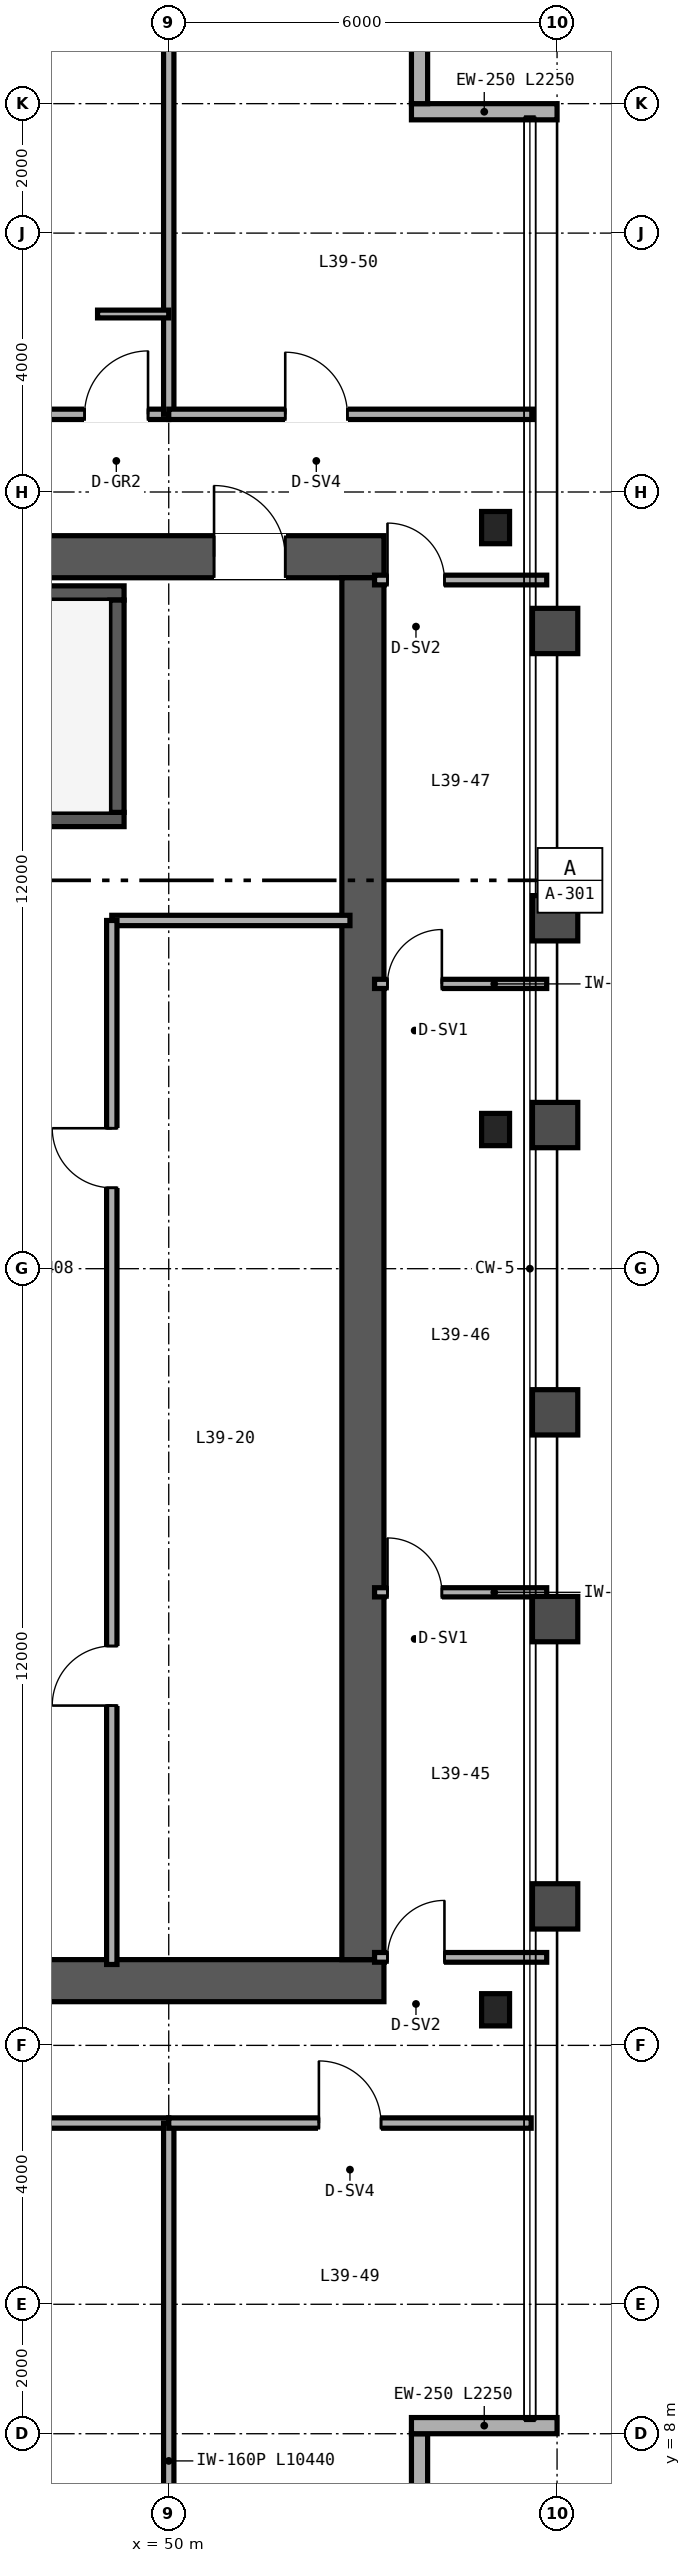
"""IFC4 building model, lengths in metres.
Left out: names, types, materials, properties, quantities, classifications, styles, units other than length and angle.
Written with IfcOpenShell. Run it as: python <this file> out.ifc"""

import sys

from ifc_helpers import new_model, si_unit, direction, frame, frame_2d, origin, origin_2d, place, context, subcontext, project, spatial, rectangle, i_section, extrude, source, transform, mapped, element, fill, save


model = new_model("IFC4")
c1 = context("Model", 3, precision=1e-05, world=origin(), true_north=direction((0.0, 1.0)))
c2 = subcontext(c1, "Body", "Model", "MODEL_VIEW")
j1 = project(units=[si_unit("LENGTHUNIT", "METRE"), si_unit("PLANEANGLEUNIT", "RADIAN")], contexts=[c1])
p1 = place(None, origin())
s1 = spatial("IfcSite", under=j1, at=p1, CompositionType="ELEMENT")
p2 = place(p1, origin())
s2 = spatial("IfcBuilding", under=s1, at=p2, CompositionType="ELEMENT")
p3 = place(p2, frame((0.0, 0.0, 158.4)))
s3 = spatial("IfcBuildingStorey", under=s2, at=p3, CompositionType="ELEMENT", Elevation=158.4)
p4 = place(p3, frame((40.675, 15.0, 0.0), z_axis=(0.0, 0.0, 1.0), x_axis=(1.0, 0.0, 0.0)))
e1 = element("IfcWall", 1, at=p4, inside=s3, PredefinedType="SHEAR", context=c2, shape_type="SweptSolid", body=[
    extrude(rectangle(XDim=12.65, YDim=0.65, at=frame_2d((6.325, 0.0))), origin(), (0.0, 0.0, 1.0), 4.57),
])
p5 = place(p4, frame((4.425, 0.0, 0.0)))
e2 = element("IfcOpeningElement", 2, at=p5, cuts=e1, PredefinedType="OPENING", context=c2, shape_type="SweptSolid", body=[
    extrude(rectangle(XDim=1.0, YDim=2.15, at=frame_2d((0.5, 1.075))), frame((0.0, 0.335, 0.0), z_axis=(0.0, -1.0, 0.0), x_axis=(1.0, 0.0, 0.0)), (0.0, 0.0, 1.0), 0.67),
])
p6 = place(p3, frame((40.675, 37.0, 0.0), z_axis=(0.0, 0.0, 1.0), x_axis=(1.0, 0.0, 0.0)))
e3 = element("IfcWall", 3, at=p6, inside=s3, PredefinedType="SHEAR", context=c2, shape_type="SweptSolid", body=[
    extrude(rectangle(XDim=12.65, YDim=0.65, at=frame_2d((6.325, 0.0))), origin(), (0.0, 0.0, 1.0), 4.57),
])
p7 = place(p6, frame((10.025, 0.0, 0.0)))
e4 = element("IfcOpeningElement", 4, at=p7, cuts=e3, PredefinedType="OPENING", context=c2, shape_type="SweptSolid", body=[
    extrude(rectangle(XDim=1.1, YDim=2.15, at=frame_2d((0.55, 1.075))), frame((0.0, 0.335, 0.0), z_axis=(0.0, -1.0, 0.0), x_axis=(1.0, 0.0, 0.0)), (0.0, 0.0, 1.0), 0.67),
])
p8 = place(p3, frame((53.0, 15.325, 0.0), z_axis=(0.0, 0.0, 1.0), x_axis=(0.0, 1.0, 0.0)))
e5 = element("IfcWall", 5, at=p8, inside=s3, PredefinedType="SHEAR", context=c2, shape_type="SweptSolid", body=[
    extrude(rectangle(XDim=21.35, YDim=0.65, at=frame_2d((10.675, 0.0))), origin(), (0.0, 0.0, 1.0), 4.57),
])
p9 = place(p3, frame((41.325, 32.94, 0.0), z_axis=(0.0, 0.0, 1.0), x_axis=(1.0, 0.0, 0.0)))
e6 = element("IfcWall", 6, at=p9, inside=s3, PredefinedType="SHEAR", context=c2, shape_type="SweptSolid", body=[
    extrude(rectangle(XDim=7.985, YDim=0.22, at=frame_2d((3.993, 0.0))), origin(), (0.0, 0.0, 1.0), 4.6),
])
p10 = place(p9, frame((0.595, 0.0, 0.0)))
e7 = element("IfcOpeningElement", 7, at=p10, cuts=e6, PredefinedType="OPENING", context=c2, shape_type="SweptSolid", body=[
    extrude(rectangle(XDim=1.05, YDim=2.15, at=frame_2d((0.525, 1.075))), frame((0.0, 0.12, 0.0), z_axis=(0.0, -1.0, 0.0), x_axis=(1.0, 0.0, 0.0)), (0.0, 0.0, 1.0), 0.24),
])
p11 = place(p3, frame((41.325, 36.44, 0.0), z_axis=(0.0, 0.0, 1.0), x_axis=(1.0, 0.0, 0.0)))
e8 = element("IfcWall", 8, at=p11, inside=s3, PredefinedType="SHEAR", context=c2, shape_type="SweptSolid", body=[
    extrude(rectangle(XDim=7.985, YDim=0.22, at=frame_2d((3.993, 0.0))), origin(), (0.0, 0.0, 1.0), 4.6),
])
p12 = place(p3, frame((49.2, 33.05, 0.0), z_axis=(0.0, 0.0, 1.0), x_axis=(0.0, 1.0, 0.0)))
e9 = element("IfcWall", 9, at=p12, inside=s3, PredefinedType="SHEAR", context=c2, shape_type="SweptSolid", body=[
    extrude(rectangle(XDim=3.28, YDim=0.22, at=frame_2d((1.64, 0.0))), origin(), (0.0, 0.0, 1.0), 4.6),
])
m1 = source(origin(), c2, "Body", "SweptSolid", [
    extrude(i_section(OverallWidth=0.432, OverallDepth=0.498, WebThickness=0.056, FlangeThickness=0.089, FilletRadius=0.025, at=origin_2d()), origin(), (0.0, 0.0, 1.0), 4.57),
])
for number, where, z_axis, x_axis in (
    (10, (55.05, 14.55, 0.0), (0.0, 0.0, 1.0), (1.0, 0.0, 0.0)),
    (11, (55.05, 28.15, 0.0), (0.0, 0.0, 1.0), (1.0, 0.0, 0.0)),
    (12, (55.05, 37.45, 0.0), (0.0, 0.0, 1.0), (1.0, 0.0, 0.0)),
):
    element("IfcColumn", number, at=place(p3, frame(where, z_axis=z_axis, x_axis=x_axis)), inside=s3, PredefinedType="COLUMN", context=c2, shape_type="MappedRepresentation", body=[
        mapped(m1, transform((0.0, 0.0, 0.0), scale=1.0)),
    ])
p13 = place(p3, frame((53.875, 6.0, 0.0), z_axis=(0.0, 0.0, 1.0), x_axis=(0.0, 1.0, 0.0)))
e13 = element("IfcWall", 13, at=p13, inside=s3, PredefinedType="SOLIDWALL", context=c2, shape_type="SweptSolid", body=[
    extrude(rectangle(XDim=2.0, YDim=0.25, at=frame_2d((1.0, 0.0))), origin(), (0.0, 0.0, 1.0), 4.57),
])
for number, where, z_axis, x_axis in (
    (14, (53.75, 8.125, 0.0), (0.0, 0.0, 1.0), (1.0, 0.0, 0.0)),
    (15, (56.0, 43.875, 0.0), (0.0, 0.0, 1.0), (-1.0, 0.0, 0.0)),
):
    element("IfcWall", number, at=place(p3, frame(where, z_axis=z_axis, x_axis=x_axis)), inside=s3, PredefinedType="SOLIDWALL", context=c2, shape_type="SweptSolid", body=[
        extrude(rectangle(XDim=2.25, YDim=0.25, at=frame_2d((1.125, 0.0))), origin(), (0.0, 0.0, 1.0), 4.57),
    ])
p14 = place(p3, frame((53.875, 44.0, 0.0), z_axis=(0.0, 0.0, 1.0), x_axis=(0.0, 1.0, 0.0)))
e16 = element("IfcWall", 16, at=p14, inside=s3, PredefinedType="SOLIDWALL", context=c2, shape_type="SweptSolid", body=[
    extrude(rectangle(XDim=2.0, YDim=0.25, at=frame_2d((1.0, 0.0))), origin(), (0.0, 0.0, 1.0), 4.57),
])
p15 = place(p3, frame((49.12, 31.38, 0.0), z_axis=(0.0, 0.0, 1.0), x_axis=(1.0, 0.0, 0.0)))
e17 = element("IfcWall", 17, at=p15, inside=s3, PredefinedType="PARTITIONING", context=c2, shape_type="SweptSolid", body=[
    extrude(rectangle(XDim=3.68, YDim=0.16, at=frame_2d((1.84, 0.0))), origin(), (0.0, 0.0, 1.0), 3.47),
])
p16 = place(p3, frame((49.12, 15.25, 0.0), z_axis=(0.0, 0.0, 1.0), x_axis=(0.0, 1.0, 0.0)))
e18 = element("IfcWall", 18, at=p16, inside=s3, PredefinedType="PARTITIONING", context=c2, shape_type="SweptSolid", body=[
    extrude(rectangle(XDim=16.13, YDim=0.16, at=frame_2d((8.065, 0.0))), origin(), (0.0, 0.0, 1.0), 3.47),
])
p17 = place(p16, frame((4.0, 0.0, 0.0)))
e19 = element("IfcOpeningElement", 19, at=p17, cuts=e18, PredefinedType="OPENING", context=c2, shape_type="SweptSolid", body=[
    extrude(rectangle(XDim=0.92, YDim=2.15, at=frame_2d((0.46, 1.075))), frame((0.0, 0.09, 0.0), z_axis=(0.0, -1.0, 0.0), x_axis=(1.0, 0.0, 0.0)), (0.0, 0.0, 1.0), 0.18),
])
p18 = place(p16, frame((12.0, 0.0, 0.0)))
e20 = element("IfcOpeningElement", 20, at=p18, cuts=e18, PredefinedType="OPENING", context=c2, shape_type="SweptSolid", body=[
    extrude(rectangle(XDim=0.92, YDim=2.15, at=frame_2d((0.46, 1.075))), frame((0.0, 0.09, 0.0), z_axis=(0.0, -1.0, 0.0), x_axis=(1.0, 0.0, 0.0)), (0.0, 0.0, 1.0), 0.18),
])
p19 = place(p3, frame((14.0, 12.8, 0.0), z_axis=(0.0, 0.0, 1.0), x_axis=(1.0, 0.0, 0.0)))
e21 = element("IfcWall", 21, at=p19, inside=s3, PredefinedType="PARTITIONING", context=c2, shape_type="SweptSolid", body=[
    extrude(rectangle(XDim=36.0, YDim=0.16, at=frame_2d((18.0, 0.0))), origin(), (0.0, 0.0, 1.0), 4.113),
])
p20 = place(p19, frame((9.7, 0.0, 0.0)))
e22 = element("IfcOpeningElement", 22, at=p20, cuts=e21, PredefinedType="OPENING", context=c2, shape_type="SweptSolid", body=[
    extrude(rectangle(XDim=0.98, YDim=2.2, at=frame_2d((0.49, 1.1))), frame((0.0, 0.09, 0.0), z_axis=(0.0, -1.0, 0.0), x_axis=(1.0, 0.0, 0.0)), (0.0, 0.0, 1.0), 0.18),
])
p21 = place(p19, frame((16.02, 0.0, 0.0)))
e23 = element("IfcOpeningElement", 23, at=p21, cuts=e21, PredefinedType="OPENING", context=c2, shape_type="SweptSolid", body=[
    extrude(rectangle(XDim=0.96, YDim=2.15, at=frame_2d((0.48, 1.075))), frame((0.0, 0.09, 0.0), z_axis=(0.0, -1.0, 0.0), x_axis=(1.0, 0.0, 0.0)), (0.0, 0.0, 1.0), 0.18),
])
p22 = place(p19, frame((28.7, 0.0, 0.0)))
e24 = element("IfcOpeningElement", 24, at=p22, cuts=e21, PredefinedType="OPENING", context=c2, shape_type="SweptSolid", body=[
    extrude(rectangle(XDim=0.98, YDim=2.2, at=frame_2d((0.49, 1.1))), frame((0.0, 0.09, 0.0), z_axis=(0.0, -1.0, 0.0), x_axis=(1.0, 0.0, 0.0)), (0.0, 0.0, 1.0), 0.18),
])
p23 = place(p19, frame((32.52, 0.0, 0.0)))
e25 = element("IfcOpeningElement", 25, at=p23, cuts=e21, PredefinedType="OPENING", context=c2, shape_type="SweptSolid", body=[
    extrude(rectangle(XDim=0.96, YDim=2.15, at=frame_2d((0.48, 1.075))), frame((0.0, 0.09, 0.0), z_axis=(0.0, -1.0, 0.0), x_axis=(1.0, 0.0, 0.0)), (0.0, 0.0, 1.0), 0.18),
])
p24 = place(p3, frame((50.0, 2.36, 0.0), z_axis=(0.0, 0.0, 1.0), x_axis=(0.0, 1.0, 0.0)))
e26 = element("IfcWall", 26, at=p24, inside=s3, PredefinedType="PARTITIONING", context=c2, shape_type="SweptSolid", body=[
    extrude(rectangle(XDim=10.44, YDim=0.16, at=frame_2d((5.22, 0.0))), origin(), (0.0, 0.0, 1.0), 3.877),
])
p25 = place(p3, frame((14.0, 39.2, 0.0), z_axis=(0.0, 0.0, 1.0), x_axis=(1.0, 0.0, 0.0)))
e27 = element("IfcWall", 27, at=p25, inside=s3, PredefinedType="PARTITIONING", context=c2, shape_type="SweptSolid", body=[
    extrude(rectangle(XDim=36.0, YDim=0.16, at=frame_2d((18.0, 0.0))), origin(), (0.0, 0.0, 1.0), 4.113),
])
p26 = place(p25, frame((7.2, 0.0, 0.0)))
e28 = element("IfcOpeningElement", 28, at=p26, cuts=e27, PredefinedType="OPENING", context=c2, shape_type="SweptSolid", body=[
    extrude(rectangle(XDim=0.98, YDim=2.2, at=frame_2d((0.49, 1.1))), frame((0.0, 0.09, 0.0), z_axis=(0.0, -1.0, 0.0), x_axis=(1.0, 0.0, 0.0)), (0.0, 0.0, 1.0), 0.18),
])
p27 = place(p25, frame((16.2, 0.0, 0.0)))
e29 = element("IfcOpeningElement", 29, at=p27, cuts=e27, PredefinedType="OPENING", context=c2, shape_type="SweptSolid", body=[
    extrude(rectangle(XDim=0.98, YDim=2.2, at=frame_2d((0.49, 1.1))), frame((0.0, 0.09, 0.0), z_axis=(0.0, -1.0, 0.0), x_axis=(1.0, 0.0, 0.0)), (0.0, 0.0, 1.0), 0.18),
])
p28 = place(p25, frame((21.77, 0.0, 0.0)))
e30 = element("IfcOpeningElement", 30, at=p28, cuts=e27, PredefinedType="OPENING", context=c2, shape_type="SweptSolid", body=[
    extrude(rectangle(XDim=0.96, YDim=2.15, at=frame_2d((0.48, 1.075))), frame((0.0, 0.09, 0.0), z_axis=(0.0, -1.0, 0.0), x_axis=(1.0, 0.0, 0.0)), (0.0, 0.0, 1.0), 0.18),
])
p29 = place(p25, frame((34.7, 0.0, 0.0)))
e31 = element("IfcOpeningElement", 31, at=p29, cuts=e27, PredefinedType="OPENING", context=c2, shape_type="SweptSolid", body=[
    extrude(rectangle(XDim=0.98, YDim=2.2, at=frame_2d((0.49, 1.1))), frame((0.0, 0.09, 0.0), z_axis=(0.0, -1.0, 0.0), x_axis=(1.0, 0.0, 0.0)), (0.0, 0.0, 1.0), 0.18),
])
p30 = place(p3, frame((50.0, 39.2, 0.0), z_axis=(0.0, 0.0, 1.0), x_axis=(0.0, 1.0, 0.0)))
e32 = element("IfcWall", 32, at=p30, inside=s3, PredefinedType="PARTITIONING", context=c2, shape_type="SweptSolid", body=[
    extrude(rectangle(XDim=10.44, YDim=0.16, at=frame_2d((5.22, 0.0))), origin(), (0.0, 0.0, 1.0), 3.877),
])
p31 = place(p3, frame((48.9, 40.75, 0.0), z_axis=(0.0, 0.0, 1.0), x_axis=(1.0, 0.0, 0.0)))
e33 = element("IfcWall", 33, at=p31, inside=s3, PredefinedType="PARTITIONING", context=c2, shape_type="SweptSolid", body=[
    extrude(rectangle(XDim=1.1, YDim=0.12, at=frame_2d((0.55, 0.0))), origin(), (0.0, 0.0, 1.0), 4.57),
])
p32 = place(p3, frame((53.18, 15.36, 0.0), z_axis=(0.0, 0.0, 1.0), x_axis=(1.0, 0.0, 0.0)))
e34 = element("IfcWall", 34, at=p32, inside=s3, PredefinedType="PARTITIONING", context=c2, shape_type="SweptSolid", body=[
    extrude(rectangle(XDim=2.66, YDim=0.15, at=frame_2d((1.33, 0.0))), origin(), (0.0, 0.0, 1.0), 3.791),
])
p33 = place(p32, frame((0.2, 0.0, 0.0)))
e35 = element("IfcOpeningElement", 35, at=p33, cuts=e34, PredefinedType="OPENING", context=c2, shape_type="SweptSolid", body=[
    extrude(rectangle(XDim=0.88, YDim=2.15, at=frame_2d((0.44, 1.075))), frame((0.0, 0.085, 0.0), z_axis=(0.0, -1.0, 0.0), x_axis=(1.0, 0.0, 0.0)), (0.0, 0.0, 1.0), 0.17),
])
p34 = place(p3, frame((53.18, 36.64, 0.0), z_axis=(0.0, 0.0, 1.0), x_axis=(1.0, 0.0, 0.0)))
e36 = element("IfcWall", 36, at=p34, inside=s3, PredefinedType="PARTITIONING", context=c2, shape_type="SweptSolid", body=[
    extrude(rectangle(XDim=2.66, YDim=0.15, at=frame_2d((1.33, 0.0))), origin(), (0.0, 0.0, 1.0), 3.953),
])
p35 = place(p34, frame((0.2, 0.0, 0.0)))
e37 = element("IfcOpeningElement", 37, at=p35, cuts=e36, PredefinedType="OPENING", context=c2, shape_type="SweptSolid", body=[
    extrude(rectangle(XDim=0.88, YDim=2.15, at=frame_2d((0.44, 1.075))), frame((0.0, 0.085, 0.0), z_axis=(0.0, -1.0, 0.0), x_axis=(1.0, 0.0, 0.0)), (0.0, 0.0, 1.0), 0.17),
])
p36 = place(p3, frame((53.18, 21.0, 0.0), z_axis=(0.0, 0.0, 1.0), x_axis=(1.0, 0.0, 0.0)))
e38 = element("IfcWall", 38, at=p36, inside=s3, PredefinedType="PARTITIONING", context=c2, shape_type="SweptSolid", body=[
    extrude(rectangle(XDim=2.66, YDim=0.142, at=frame_2d((1.33, 0.0))), origin(), (0.0, 0.0, 1.0), 3.791),
])
p37 = place(p36, frame((0.2, 0.0, 0.0)))
e39 = element("IfcOpeningElement", 39, at=p37, cuts=e38, PredefinedType="OPENING", context=c2, shape_type="SweptSolid", body=[
    extrude(rectangle(XDim=0.84, YDim=2.1, at=frame_2d((0.42, 1.05))), frame((0.0, 0.081, 0.0), z_axis=(0.0, -1.0, 0.0), x_axis=(1.0, 0.0, 0.0)), (0.0, 0.0, 1.0), 0.162),
])
p38 = place(p3, frame((53.18, 30.4, 0.0), z_axis=(0.0, 0.0, 1.0), x_axis=(1.0, 0.0, 0.0)))
e40 = element("IfcWall", 40, at=p38, inside=s3, PredefinedType="PARTITIONING", context=c2, shape_type="SweptSolid", body=[
    extrude(rectangle(XDim=2.66, YDim=0.142, at=frame_2d((1.33, 0.0))), origin(), (0.0, 0.0, 1.0), 3.953),
])
p39 = place(p38, frame((0.2, 0.0, 0.0)))
e41 = element("IfcOpeningElement", 41, at=p39, cuts=e40, PredefinedType="OPENING", context=c2, shape_type="SweptSolid", body=[
    extrude(rectangle(XDim=0.84, YDim=2.1, at=frame_2d((0.42, 1.05))), frame((0.0, 0.081, 0.0), z_axis=(0.0, -1.0, 0.0), x_axis=(1.0, 0.0, 0.0)), (0.0, 0.0, 1.0), 0.162),
])
p40 = place(p3, frame((50.0, 12.8, 0.0), z_axis=(0.0, 0.0, 1.0), x_axis=(1.0, 0.0, 0.0)))
e42 = element("IfcWall", 42, at=p40, inside=s3, PredefinedType="PARTITIONING", context=c2, shape_type="SweptSolid", body=[
    extrude(rectangle(XDim=5.6, YDim=0.16, at=frame_2d((2.8, 0.0))), origin(), (0.0, 0.0, 1.0), 4.57),
])
p41 = place(p40, frame((2.32, 0.0, 0.0)))
e43 = element("IfcOpeningElement", 43, at=p41, cuts=e42, PredefinedType="OPENING", context=c2, shape_type="SweptSolid", body=[
    extrude(rectangle(XDim=0.96, YDim=2.15, at=frame_2d((0.48, 1.075))), frame((0.0, 0.09, 0.0), z_axis=(0.0, -1.0, 0.0), x_axis=(1.0, 0.0, 0.0)), (0.0, 0.0, 1.0), 0.18),
])
p42 = place(p3, frame((50.0, 39.2, 0.0), z_axis=(0.0, 0.0, 1.0), x_axis=(1.0, 0.0, 0.0)))
e44 = element("IfcWall", 44, at=p42, inside=s3, PredefinedType="PARTITIONING", context=c2, shape_type="SweptSolid", body=[
    extrude(rectangle(XDim=5.62, YDim=0.16, at=frame_2d((2.81, 0.0))), origin(), (0.0, 0.0, 1.0), 4.57),
])
p43 = place(p42, frame((1.8, 0.0, 0.0)))
e45 = element("IfcOpeningElement", 45, at=p43, cuts=e44, PredefinedType="OPENING", context=c2, shape_type="SweptSolid", body=[
    extrude(rectangle(XDim=0.96, YDim=2.15, at=frame_2d((0.48, 1.075))), frame((0.0, 0.09, 0.0), z_axis=(0.0, -1.0, 0.0), x_axis=(1.0, 0.0, 0.0)), (0.0, 0.0, 1.0), 0.18),
])
m2 = source(origin(), c2, "Body", "SweptSolid", [
    extrude(rectangle(XDim=1.1, YDim=2.15, at=frame_2d((0.55, 1.075))), frame((0.0, 0.025, 0.0), z_axis=(0.0, -1.0, 0.0), x_axis=(1.0, 0.0, 0.0)), (0.0, 0.0, 1.0), 0.05),
])
p44 = place(p7, origin())
e46 = element("IfcDoor", 46, at=p44, inside=s3, OperationType="SINGLE_SWING_LEFT", PredefinedType="DOOR", context=c2, shape_type="MappedRepresentation", body=[
    mapped(m2, transform((0.0, 0.0, 0.0), scale=1.0)),
])
fill(e4, e46)
m3 = source(origin(), c2, "Body", "SweptSolid", [
    extrude(rectangle(XDim=0.92, YDim=2.15, at=frame_2d((0.46, 1.075))), frame((0.0, 0.025, 0.0), z_axis=(0.0, -1.0, 0.0), x_axis=(1.0, 0.0, 0.0)), (0.0, 0.0, 1.0), 0.05),
])
p45 = place(p17, origin())
e47 = element("IfcDoor", 47, at=p45, inside=s3, OperationType="SINGLE_SWING_LEFT", PredefinedType="DOOR", context=c2, shape_type="MappedRepresentation", body=[
    mapped(m3, transform((0.0, 0.0, 0.0), scale=1.0)),
])
fill(e19, e47)
p46 = place(p18, origin())
e48 = element("IfcDoor", 48, at=p46, inside=s3, OperationType="SINGLE_SWING_RIGHT", PredefinedType="DOOR", context=c2, shape_type="MappedRepresentation", body=[
    mapped(m3, transform((0.0, 0.0, 0.0), scale=1.0)),
])
fill(e20, e48)
m4 = source(origin(), c2, "Body", "SweptSolid", [
    extrude(rectangle(XDim=0.98, YDim=2.2, at=frame_2d((0.49, 1.1))), frame((0.0, 0.025, 0.0), z_axis=(0.0, -1.0, 0.0), x_axis=(1.0, 0.0, 0.0)), (0.0, 0.0, 1.0), 0.05),
])
p47 = place(p29, origin())
e49 = element("IfcDoor", 49, at=p47, inside=s3, OperationType="SINGLE_SWING_RIGHT", PredefinedType="DOOR", context=c2, shape_type="MappedRepresentation", body=[
    mapped(m4, transform((0.0, 0.0, 0.0), scale=1.0)),
])
fill(e31, e49)
m5 = source(origin(), c2, "Body", "SweptSolid", [
    extrude(rectangle(XDim=0.88, YDim=2.15, at=frame_2d((0.44, 1.075))), frame((0.0, 0.025, 0.0), z_axis=(0.0, -1.0, 0.0), x_axis=(1.0, 0.0, 0.0)), (0.0, 0.0, 1.0), 0.05),
])
p48 = place(p33, origin())
e50 = element("IfcDoor", 50, at=p48, inside=s3, OperationType="SINGLE_SWING_RIGHT", PredefinedType="DOOR", context=c2, shape_type="MappedRepresentation", body=[
    mapped(m5, transform((0.0, 0.0, 0.0), scale=1.0)),
])
fill(e35, e50)
p49 = place(p35, origin())
e51 = element("IfcDoor", 51, at=p49, inside=s3, OperationType="SINGLE_SWING_LEFT", PredefinedType="DOOR", context=c2, shape_type="MappedRepresentation", body=[
    mapped(m5, transform((0.0, 0.0, 0.0), scale=1.0)),
])
fill(e37, e51)
m6 = source(origin(), c2, "Body", "SweptSolid", [
    extrude(rectangle(XDim=0.84, YDim=2.1, at=frame_2d((0.42, 1.05))), frame((0.0, 0.025, 0.0), z_axis=(0.0, -1.0, 0.0), x_axis=(1.0, 0.0, 0.0)), (0.0, 0.0, 1.0), 0.05),
])
p50 = place(p37, origin())
e52 = element("IfcDoor", 52, at=p50, inside=s3, OperationType="SINGLE_SWING_LEFT", PredefinedType="DOOR", context=c2, shape_type="MappedRepresentation", body=[
    mapped(m6, transform((0.0, 0.0, 0.0), scale=1.0)),
])
fill(e39, e52)
p51 = place(p39, origin())
e53 = element("IfcDoor", 53, at=p51, inside=s3, OperationType="SINGLE_SWING_RIGHT", PredefinedType="DOOR", context=c2, shape_type="MappedRepresentation", body=[
    mapped(m6, transform((0.0, 0.0, 0.0), scale=1.0)),
])
fill(e41, e53)
m7 = source(origin(), c2, "Body", "SweptSolid", [
    extrude(rectangle(XDim=0.96, YDim=2.15, at=frame_2d((0.48, 1.075))), frame((0.0, 0.025, 0.0), z_axis=(0.0, -1.0, 0.0), x_axis=(1.0, 0.0, 0.0)), (0.0, 0.0, 1.0), 0.05),
])
p52 = place(p41, origin())
e54 = element("IfcDoor", 54, at=p52, inside=s3, OperationType="SINGLE_SWING_LEFT", PredefinedType="DOOR", context=c2, shape_type="MappedRepresentation", body=[
    mapped(m7, transform((0.0, 0.0, 0.0), scale=1.0)),
])
fill(e43, e54)
p53 = place(p43, origin())
e55 = element("IfcDoor", 55, at=p53, inside=s3, OperationType="SINGLE_SWING_LEFT", PredefinedType="DOOR", context=c2, shape_type="MappedRepresentation", body=[
    mapped(m7, transform((0.0, 0.0, 0.0), scale=1.0)),
])
fill(e45, e55)
save(model, sys.argv[1])
